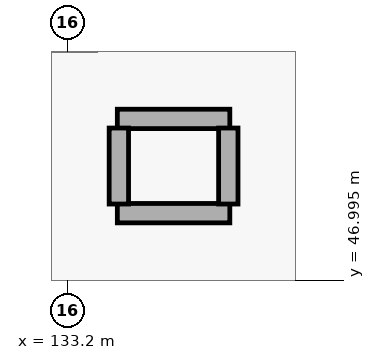
"""IFC4 building model, lengths in metres.
Left out: names, types, materials, properties, quantities, classifications, styles, units other than length and angle.
Written with IfcOpenShell. Run it as: python <this file> out.ifc"""

import sys

from ifc_helpers import new_model, si_unit, direction, frame, frame_2d, origin, place, context, subcontext, project, spatial, rectangle, extrude, element, save


model = new_model("IFC4")
c1 = context("Model", 3, precision=1e-05, world=origin(), true_north=direction((0.0, 1.0)))
c2 = subcontext(c1, "Body", "Model", "MODEL_VIEW")
j1 = project(units=[si_unit("LENGTHUNIT", "METRE"), si_unit("PLANEANGLEUNIT", "RADIAN")], contexts=[c1])
p1 = place(None, origin())
s1 = spatial("IfcSite", under=j1, at=p1, CompositionType="ELEMENT")
p2 = place(p1, origin())
s2 = spatial("IfcBuilding", under=s1, at=p2, CompositionType="ELEMENT")
p3 = place(p2, frame((0.0, 0.0, 5.4)))
s3 = spatial("IfcBuildingStorey", under=s2, at=p3, CompositionType="ELEMENT", Elevation=5.4)
for number, where, z_axis, x_axis in (
    (1, (133.86, 49.12, 0.0), (0.0, 0.0, 1.0), (1.0, 0.0, 0.0)),
    (2, (133.86, 47.88, 0.0), (0.0, 0.0, 1.0), (1.0, 0.0, 0.0)),
):
    element("IfcWall", number, at=place(p3, frame(where, z_axis=z_axis, x_axis=x_axis)), inside=s3, PredefinedType="PARTITIONING", context=c2, shape_type="SweptSolid", body=[
        extrude(rectangle(XDim=1.48, YDim=0.255, at=frame_2d((0.74, 0.0))), origin(), (0.0, 0.0, 1.0), 4.72),
    ])
for number, where, z_axis, x_axis in (
    (3, (133.88, 48.0, 0.0), (0.0, 0.0, 1.0), (0.0, 1.0, 0.0)),
    (4, (135.32, 48.0, 0.0), (0.0, 0.0, 1.0), (0.0, 1.0, 0.0)),
):
    element("IfcWall", number, at=place(p3, frame(where, z_axis=z_axis, x_axis=x_axis)), inside=s3, PredefinedType="PARTITIONING", context=c2, shape_type="SweptSolid", body=[
        extrude(rectangle(XDim=1.0, YDim=0.255, at=frame_2d((0.5, 0.0))), origin(), (0.0, 0.0, 1.0), 4.72),
    ])
save(model, sys.argv[1])
